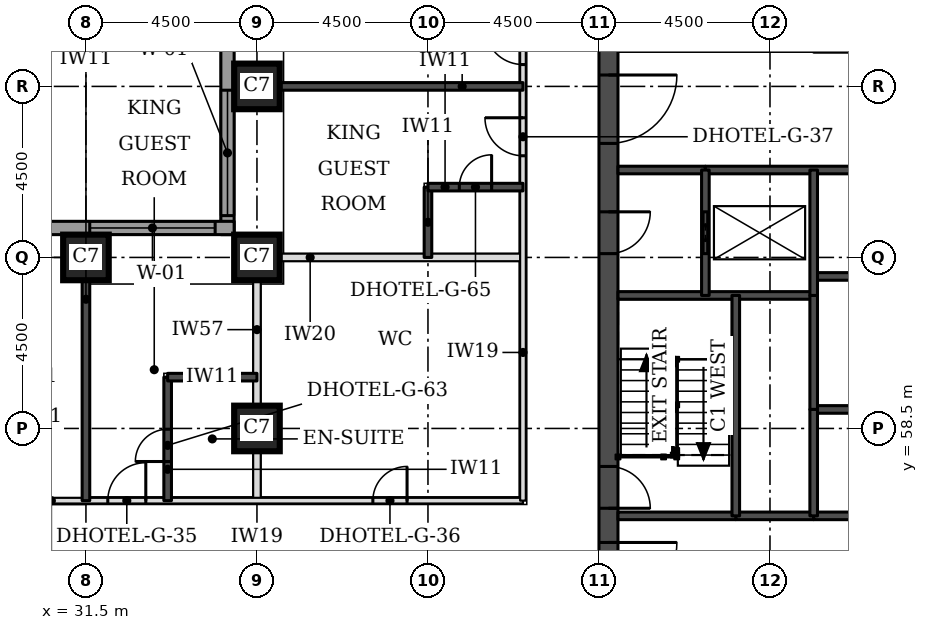
"""IFC4 building model, lengths in metres.
Left out: names, types, materials, properties, quantities, classifications, styles, units other than length and angle.
Written with IfcOpenShell. Run it as: python <this file> out.ifc"""

import sys

from ifc_helpers import new_model, si_unit, direction, frame, frame_2d, origin, origin_2d, place, context, subcontext, project, spatial, rectangle, extrude, element, fill, save


model = new_model("IFC4")
c1 = context("Model", 3, precision=1e-05, world=origin(), true_north=direction((0.0, 1.0)))
c2 = subcontext(c1, "Body", "Model", "MODEL_VIEW")
j1 = project(units=[si_unit("LENGTHUNIT", "METRE"), si_unit("PLANEANGLEUNIT", "RADIAN")], contexts=[c1])
p1 = place(None, origin())
s1 = spatial("IfcSite", under=j1, at=p1, CompositionType="ELEMENT")
p2 = place(p1, origin())
s2 = spatial("IfcBuilding", under=s1, at=p2, CompositionType="ELEMENT")
p3 = place(p2, frame((0.0, 0.0, 66.0)))
s3 = spatial("IfcBuildingStorey", under=s2, at=p3, CompositionType="ELEMENT", Elevation=66.0)
for number, where, z_axis, x_axis in (
    (1, (36.0, 58.5, 0.0), (0.0, 0.0, 1.0), (1.0, 0.0, 0.0)),
    (2, (31.5, 63.0, 0.0), (0.0, 0.0, 1.0), (1.0, 0.0, 0.0)),
    (3, (36.0, 63.0, 0.0), (0.0, 0.0, 1.0), (1.0, 0.0, 0.0)),
    (4, (36.0, 67.5, 0.0), (0.0, 0.0, 1.0), (1.0, 0.0, 0.0)),
):
    element("IfcColumn", number, at=place(p3, frame(where, z_axis=z_axis, x_axis=x_axis)), inside=s3, PredefinedType="COLUMN", context=c2, shape_type="SweptSolid", body=[
        extrude(rectangle(XDim=1.2, YDim=1.2, at=origin_2d()), origin(), (0.0, 0.0, 1.0), 3.3),
    ])
p4 = place(p3, frame((45.25, 49.5, 0.0), z_axis=(0.0, 0.0, 1.0), x_axis=(0.0, 1.0, 0.0)))
e5 = element("IfcWall", 5, at=p4, inside=s3, PredefinedType="SHEAR", context=c2, shape_type="SweptSolid", body=[
    extrude(rectangle(XDim=22.5, YDim=0.5, at=frame_2d((11.25, 0.0))), origin(), (0.0, 0.0, 1.0), 3.3),
])
p5 = place(p4, frame((4.2, 0.0, 0.0)))
e6 = element("IfcOpeningElement", 6, at=p5, cuts=e5, PredefinedType="OPENING", context=c2, shape_type="SweptSolid", body=[
    extrude(rectangle(XDim=1.8, YDim=2.1, at=frame_2d((0.9, 1.05))), frame((0.0, 0.26, 0.0), z_axis=(0.0, -1.0, 0.0), x_axis=(1.0, 0.0, 0.0)), (0.0, 0.0, 1.0), 0.52),
])
p6 = place(p4, frame((6.9, 0.0, 0.0)))
e7 = element("IfcOpeningElement", 7, at=p6, cuts=e5, PredefinedType="OPENING", context=c2, shape_type="SweptSolid", body=[
    extrude(rectangle(XDim=1.1, YDim=2.1, at=frame_2d((0.55, 1.05))), frame((0.0, 0.26, 0.0), z_axis=(0.0, -1.0, 0.0), x_axis=(1.0, 0.0, 0.0)), (0.0, 0.0, 1.0), 0.52),
])
p7 = place(p4, frame((13.6, 0.0, 0.0)))
e8 = element("IfcOpeningElement", 8, at=p7, cuts=e5, PredefinedType="OPENING", context=c2, shape_type="SweptSolid", body=[
    extrude(rectangle(XDim=1.1, YDim=2.1, at=frame_2d((0.55, 1.05))), frame((0.0, 0.26, 0.0), z_axis=(0.0, -1.0, 0.0), x_axis=(1.0, 0.0, 0.0)), (0.0, 0.0, 1.0), 0.52),
])
p8 = place(p4, frame((16.5, 0.0, 0.0)))
e9 = element("IfcOpeningElement", 9, at=p8, cuts=e5, PredefinedType="OPENING", context=c2, shape_type="SweptSolid", body=[
    extrude(rectangle(XDim=1.8, YDim=2.1, at=frame_2d((0.9, 1.05))), frame((0.0, 0.26, 0.0), z_axis=(0.0, -1.0, 0.0), x_axis=(1.0, 0.0, 0.0)), (0.0, 0.0, 1.0), 0.52),
])
p9 = place(p3, frame((35.225, 76.894, 0.0), z_axis=(0.0, 0.0, 1.0), x_axis=(0.0, -1.0, 0.0)))
e10 = element("IfcWall", 10, at=p9, inside=s3, PredefinedType="STANDARD", context=c2, shape_type="SweptSolid", body=[
    extrude(rectangle(XDim=13.293, YDim=0.35, at=frame_2d((6.647, 0.0))), origin(), (0.0, 0.0, 1.0), 3.055),
])
p10 = place(p9, frame((9.493, 0.0, 0.8)))
e11 = element("IfcOpeningElement", 11, at=p10, cuts=e10, PredefinedType="OPENING", context=c2, shape_type="SweptSolid", body=[
    extrude(rectangle(XDim=3.3, YDim=1.5, at=frame_2d((1.65, 0.75))), frame((0.0, 0.185, 0.0), z_axis=(0.0, -1.0, 0.0), x_axis=(1.0, 0.0, 0.0)), (0.0, 0.0, 1.0), 0.37),
])
p11 = place(p3, frame((35.4, 63.775, 0.0), z_axis=(0.0, 0.0, 1.0), x_axis=(-1.0, 0.0, 0.0)))
e12 = element("IfcWall", 12, at=p11, inside=s3, PredefinedType="STANDARD", context=c2, shape_type="SweptSolid", body=[
    extrude(rectangle(XDim=17.793, YDim=0.35, at=frame_2d((8.897, 0.0))), origin(), (0.0, 0.0, 1.0), 3.055),
])
p12 = place(p11, frame((0.5, 0.0, 0.8)))
e13 = element("IfcOpeningElement", 13, at=p12, cuts=e12, PredefinedType="OPENING", context=c2, shape_type="SweptSolid", body=[
    extrude(rectangle(XDim=3.3, YDim=1.5, at=frame_2d((1.65, 0.75))), frame((0.0, 0.185, 0.0), z_axis=(0.0, -1.0, 0.0), x_axis=(1.0, 0.0, 0.0)), (0.0, 0.0, 1.0), 0.37),
])
p13 = place(p11, frame((9.0, 0.0, 0.8)))
e14 = element("IfcOpeningElement", 14, at=p13, cuts=e12, PredefinedType="OPENING", context=c2, shape_type="SweptSolid", body=[
    extrude(rectangle(XDim=3.3, YDim=1.5, at=frame_2d((1.65, 0.75))), frame((0.0, 0.185, 0.0), z_axis=(0.0, -1.0, 0.0), x_axis=(1.0, 0.0, 0.0)), (0.0, 0.0, 1.0), 0.37),
])
p14 = place(p3, frame((36.0, 56.6, 0.0), z_axis=(0.0, 0.0, 1.0), x_axis=(0.0, 1.0, 0.0)))
e15 = element("IfcWall", 15, at=p14, inside=s3, PredefinedType="PARTITIONING", context=c2, shape_type="SweptSolid", body=[
    extrude(rectangle(XDim=5.8, YDim=0.2, at=frame_2d((2.9, 0.0))), origin(), (0.0, 0.0, 1.0), 2.33),
])
p15 = place(p3, frame((36.6, 63.0, 0.0), z_axis=(0.0, 0.0, 1.0), x_axis=(1.0, 0.0, 0.0)))
e16 = element("IfcWall", 16, at=p15, inside=s3, PredefinedType="PARTITIONING", context=c2, shape_type="SweptSolid", body=[
    extrude(rectangle(XDim=6.4, YDim=0.2, at=frame_2d((3.2, 0.0))), origin(), (0.0, 0.0, 1.0), 3.08),
])
p16 = place(p3, frame((29.38, 56.6, 0.0), z_axis=(0.0, 0.0, 1.0), x_axis=(1.0, 0.0, 0.0)))
e17 = element("IfcWall", 17, at=p16, inside=s3, PredefinedType="PARTITIONING", context=c2, shape_type="SweptSolid", body=[
    extrude(rectangle(XDim=13.62, YDim=0.15, at=frame_2d((6.81, 0.0))), origin(), (0.0, 0.0, 1.0), 3.08),
])
p17 = place(p16, frame((2.695, 0.0, 0.0)))
e18 = element("IfcOpeningElement", 18, at=p17, cuts=e17, PredefinedType="OPENING", context=c2, shape_type="SweptSolid", body=[
    extrude(rectangle(XDim=1.0, YDim=2.1, at=frame_2d((0.5, 1.05))), frame((0.0, 0.085, 0.0), z_axis=(0.0, -1.0, 0.0), x_axis=(1.0, 0.0, 0.0)), (0.0, 0.0, 1.0), 0.17),
])
p18 = place(p16, frame((9.67, 0.0, 0.0)))
e19 = element("IfcOpeningElement", 19, at=p18, cuts=e17, PredefinedType="OPENING", context=c2, shape_type="SweptSolid", body=[
    extrude(rectangle(XDim=0.9, YDim=2.1, at=frame_2d((0.45, 1.05))), frame((0.0, 0.085, 0.0), z_axis=(0.0, -1.0, 0.0), x_axis=(1.0, 0.0, 0.0)), (0.0, 0.0, 1.0), 0.17),
])
p19 = place(p3, frame((43.0, 56.6, 0.0), z_axis=(0.0, 0.0, 1.0), x_axis=(0.0, 1.0, 0.0)))
e20 = element("IfcWall", 20, at=p19, inside=s3, PredefinedType="PARTITIONING", context=c2, shape_type="SweptSolid", body=[
    extrude(rectangle(XDim=17.4, YDim=0.15, at=frame_2d((8.7, 0.0))), origin(), (0.0, 0.0, 1.0), 3.08),
])
p20 = place(p19, frame((9.075, 0.0, 0.0)))
e21 = element("IfcOpeningElement", 21, at=p20, cuts=e20, PredefinedType="OPENING", context=c2, shape_type="SweptSolid", body=[
    extrude(rectangle(XDim=1.0, YDim=2.1, at=frame_2d((0.5, 1.05))), frame((0.0, 0.085, 0.0), z_axis=(0.0, -1.0, 0.0), x_axis=(1.0, 0.0, 0.0)), (0.0, 0.0, 1.0), 0.17),
])
p21 = place(p19, frame((11.475, 0.0, 0.0)))
e22 = element("IfcOpeningElement", 22, at=p21, cuts=e20, PredefinedType="OPENING", context=c2, shape_type="SweptSolid", body=[
    extrude(rectangle(XDim=1.0, YDim=2.1, at=frame_2d((0.5, 1.05))), frame((0.0, 0.085, 0.0), z_axis=(0.0, -1.0, 0.0), x_axis=(1.0, 0.0, 0.0)), (0.0, 0.0, 1.0), 0.17),
])
p22 = place(p19, frame((15.953, 0.0, 0.0)))
e23 = element("IfcOpeningElement", 23, at=p22, cuts=e20, PredefinedType="OPENING", context=c2, shape_type="SweptSolid", body=[
    extrude(rectangle(XDim=1.0, YDim=2.1, at=frame_2d((0.5, 1.05))), frame((0.0, 0.085, 0.0), z_axis=(0.0, -1.0, 0.0), x_axis=(1.0, 0.0, 0.0)), (0.0, 0.0, 1.0), 0.17),
])
p23 = place(p3, frame((31.5, 56.6, 0.0), z_axis=(0.0, 0.0, 1.0), x_axis=(0.0, 1.0, 0.0)))
e24 = element("IfcWall", 24, at=p23, inside=s3, PredefinedType="SOLIDWALL", context=c2, shape_type="SweptSolid", body=[
    extrude(rectangle(XDim=5.8, YDim=0.2, at=frame_2d((2.9, 0.0))), origin(), (0.0, 0.0, 1.0), 3.08),
])
p24 = place(p3, frame((33.65, 56.6, 0.0), z_axis=(0.0, 0.0, 1.0), x_axis=(0.0, 1.0, 0.0)))
e25 = element("IfcWall", 25, at=p24, inside=s3, PredefinedType="SOLIDWALL", context=c2, shape_type="SweptSolid", body=[
    extrude(rectangle(XDim=3.25, YDim=0.2, at=frame_2d((1.625, 0.0))), origin(), (0.0, 0.0, 1.0), 3.08),
])
p25 = place(p24, frame((1.03, 0.0, 0.0)))
e26 = element("IfcOpeningElement", 26, at=p25, cuts=e25, PredefinedType="OPENING", context=c2, shape_type="SweptSolid", body=[
    extrude(rectangle(XDim=0.85, YDim=2.1, at=frame_2d((0.425, 1.05))), frame((0.0, 0.11, 0.0), z_axis=(0.0, -1.0, 0.0), x_axis=(1.0, 0.0, 0.0)), (0.0, 0.0, 1.0), 0.22),
])
p26 = place(p3, frame((33.65, 59.85, 0.0), z_axis=(0.0, 0.0, 1.0), x_axis=(1.0, 0.0, 0.0)))
e27 = element("IfcWall", 27, at=p26, inside=s3, PredefinedType="SOLIDWALL", context=c2, shape_type="SweptSolid", body=[
    extrude(rectangle(XDim=2.35, YDim=0.2, at=frame_2d((1.175, 0.0))), origin(), (0.0, 0.0, 1.0), 3.08),
])
p27 = place(p3, frame((40.5, 63.0, 0.0), z_axis=(0.0, 0.0, 1.0), x_axis=(0.0, 1.0, 0.0)))
e28 = element("IfcWall", 28, at=p27, inside=s3, PredefinedType="SOLIDWALL", context=c2, shape_type="SweptSolid", body=[
    extrude(rectangle(XDim=1.85, YDim=0.2, at=frame_2d((0.925, 0.0))), origin(), (0.0, 0.0, 1.0), 3.08),
])
p28 = place(p3, frame((40.5, 64.85, 0.0), z_axis=(0.0, 0.0, 1.0), x_axis=(1.0, 0.0, 0.0)))
e29 = element("IfcWall", 29, at=p28, inside=s3, PredefinedType="SOLIDWALL", context=c2, shape_type="SweptSolid", body=[
    extrude(rectangle(XDim=2.5, YDim=0.2, at=frame_2d((1.25, 0.0))), origin(), (0.0, 0.0, 1.0), 3.08),
])
p29 = place(p28, frame((0.825, 0.0, 0.0)))
e30 = element("IfcOpeningElement", 30, at=p29, cuts=e29, PredefinedType="OPENING", context=c2, shape_type="SweptSolid", body=[
    extrude(rectangle(XDim=0.85, YDim=2.1, at=frame_2d((0.425, 1.05))), frame((0.0, 0.11, 0.0), z_axis=(0.0, -1.0, 0.0), x_axis=(1.0, 0.0, 0.0)), (0.0, 0.0, 1.0), 0.22),
])
p30 = place(p3, frame((36.6, 67.5, 0.0), z_axis=(0.0, 0.0, 1.0), x_axis=(1.0, 0.0, 0.0)))
e31 = element("IfcWall", 31, at=p30, inside=s3, PredefinedType="SOLIDWALL", context=c2, shape_type="SweptSolid", body=[
    extrude(rectangle(XDim=6.4, YDim=0.2, at=frame_2d((3.2, 0.0))), origin(), (0.0, 0.0, 1.0), 3.08),
])
p31 = place(p3, frame((48.6, 56.2, 0.0), z_axis=(0.0, 0.0, 1.0), x_axis=(1.0, 0.0, 0.0)))
e32 = element("IfcWall", 32, at=p31, inside=s3, PredefinedType="SOLIDWALL", context=c2, shape_type="SweptSolid", body=[
    extrude(rectangle(XDim=2.05, YDim=0.2, at=frame_2d((1.025, 0.0))), origin(), (0.0, 0.0, 1.0), 3.08),
])
p32 = place(p3, frame((45.5, 56.2, 0.0), z_axis=(0.0, 0.0, 1.0), x_axis=(1.0, 0.0, 0.0)))
e33 = element("IfcWall", 33, at=p32, inside=s3, PredefinedType="SOLIDWALL", context=c2, shape_type="SweptSolid", body=[
    extrude(rectangle(XDim=3.1, YDim=0.2, at=frame_2d((1.55, 0.0))), origin(), (0.0, 0.0, 1.0), 3.08),
])
p33 = place(p3, frame((50.65, 56.2, 0.0), z_axis=(0.0, 0.0, 1.0), x_axis=(1.0, 0.0, 0.0)))
e34 = element("IfcWall", 34, at=p33, inside=s3, PredefinedType="SOLIDWALL", context=c2, shape_type="SweptSolid", body=[
    extrude(rectangle(XDim=11.2, YDim=0.2, at=frame_2d((5.6, 0.0))), origin(), (0.0, 0.0, 1.0), 3.08),
])
p34 = place(p3, frame((50.65, 59.0, 0.0), z_axis=(0.0, 0.0, 1.0), x_axis=(1.0, 0.0, 0.0)))
e35 = element("IfcWall", 35, at=p34, inside=s3, PredefinedType="SOLIDWALL", context=c2, shape_type="SweptSolid", body=[
    extrude(rectangle(XDim=11.2, YDim=0.2, at=frame_2d((5.6, 0.0))), origin(), (0.0, 0.0, 1.0), 3.3),
])
p35 = place(p3, frame((45.5, 62.0, 0.0), z_axis=(0.0, 0.0, 1.0), x_axis=(1.0, 0.0, 0.0)))
e36 = element("IfcWall", 36, at=p35, inside=s3, PredefinedType="SOLIDWALL", context=c2, shape_type="SweptSolid", body=[
    extrude(rectangle(XDim=5.15, YDim=0.2, at=frame_2d((2.575, 0.0))), origin(), (0.0, 0.0, 1.0), 3.08),
])
p36 = place(p3, frame((50.65, 62.5, 0.0), z_axis=(0.0, 0.0, 1.0), x_axis=(1.0, 0.0, 0.0)))
e37 = element("IfcWall", 37, at=p36, inside=s3, PredefinedType="SOLIDWALL", context=c2, shape_type="SweptSolid", body=[
    extrude(rectangle(XDim=11.2, YDim=0.2, at=frame_2d((5.6, 0.0))), origin(), (0.0, 0.0, 1.0), 3.3),
])
p37 = place(p3, frame((45.5, 65.3, 0.0), z_axis=(0.0, 0.0, 1.0), x_axis=(1.0, 0.0, 0.0)))
e38 = element("IfcWall", 38, at=p37, inside=s3, PredefinedType="SOLIDWALL", context=c2, shape_type="SweptSolid", body=[
    extrude(rectangle(XDim=2.3, YDim=0.2, at=frame_2d((1.15, 0.0))), origin(), (0.0, 0.0, 1.0), 3.08),
])
p38 = place(p3, frame((47.8, 65.3, 0.0), z_axis=(0.0, 0.0, 1.0), x_axis=(1.0, 0.0, 0.0)))
e39 = element("IfcWall", 39, at=p38, inside=s3, PredefinedType="SOLIDWALL", context=c2, shape_type="SweptSolid", body=[
    extrude(rectangle(XDim=16.9, YDim=0.2, at=frame_2d((8.45, 0.0))), origin(), (0.0, 0.0, 1.0), 3.08),
])
p39 = place(p3, frame((47.8, 62.0, 0.0), z_axis=(0.0, 0.0, 1.0), x_axis=(0.0, 1.0, 0.0)))
e40 = element("IfcWall", 40, at=p39, inside=s3, PredefinedType="SOLIDWALL", context=c2, shape_type="SweptSolid", body=[
    extrude(rectangle(XDim=3.3, YDim=0.2, at=frame_2d((1.65, 0.0))), origin(), (0.0, 0.0, 1.0), 3.08),
])
p40 = place(p39, frame((1.1, 0.0, 0.0)))
e41 = element("IfcOpeningElement", 41, at=p40, cuts=e40, PredefinedType="OPENING", context=c2, shape_type="SweptSolid", body=[
    extrude(rectangle(XDim=1.1, YDim=2.1, at=frame_2d((0.55, 1.05))), frame((0.0, 0.11, 0.0), z_axis=(0.0, -1.0, 0.0), x_axis=(1.0, 0.0, 0.0)), (0.0, 0.0, 1.0), 0.22),
])
p41 = place(p3, frame((48.6, 56.2, 0.0), z_axis=(0.0, 0.0, 1.0), x_axis=(0.0, 1.0, 0.0)))
e42 = element("IfcWall", 42, at=p41, inside=s3, PredefinedType="SOLIDWALL", context=c2, shape_type="SweptSolid", body=[
    extrude(rectangle(XDim=5.8, YDim=0.2, at=frame_2d((2.9, 0.0))), origin(), (0.0, 0.0, 1.0), 3.08),
])
p42 = place(p3, frame((50.65, 59.0, 0.0), z_axis=(0.0, 0.0, 1.0), x_axis=(0.0, 1.0, 0.0)))
e43 = element("IfcWall", 43, at=p42, inside=s3, PredefinedType="SOLIDWALL", context=c2, shape_type="SweptSolid", body=[
    extrude(rectangle(XDim=3.0, YDim=0.2, at=frame_2d((1.5, 0.0))), origin(), (0.0, 0.0, 1.0), 3.3),
])
p43 = place(p3, frame((50.65, 56.2, 0.0), z_axis=(0.0, 0.0, 1.0), x_axis=(0.0, 1.0, 0.0)))
e44 = element("IfcWall", 44, at=p43, inside=s3, PredefinedType="SOLIDWALL", context=c2, shape_type="SweptSolid", body=[
    extrude(rectangle(XDim=2.8, YDim=0.2, at=frame_2d((1.4, 0.0))), origin(), (0.0, 0.0, 1.0), 3.08),
])
p44 = place(p3, frame((50.65, 62.0, 0.0), z_axis=(0.0, 0.0, 1.0), x_axis=(0.0, 1.0, 0.0)))
e45 = element("IfcWall", 45, at=p44, inside=s3, PredefinedType="SOLIDWALL", context=c2, shape_type="SweptSolid", body=[
    extrude(rectangle(XDim=3.3, YDim=0.2, at=frame_2d((1.65, 0.0))), origin(), (0.0, 0.0, 1.0), 3.08),
])
p45 = place(p10, origin())
e46 = element("IfcWindow", 46, at=p45, inside=s3, PartitioningType="SINGLE_PANEL", PredefinedType="WINDOW", context=c2, shape_type="SweptSolid", body=[
    extrude(rectangle(XDim=3.3, YDim=1.5, at=frame_2d((1.65, 0.75))), frame((0.0, 0.085, 0.0), z_axis=(0.0, -1.0, 0.0), x_axis=(1.0, 0.0, 0.0)), (0.0, 0.0, 1.0), 0.06),
])
fill(e11, e46)
p46 = place(p12, origin())
e47 = element("IfcWindow", 47, at=p46, inside=s3, PartitioningType="SINGLE_PANEL", PredefinedType="WINDOW", context=c2, shape_type="SweptSolid", body=[
    extrude(rectangle(XDim=3.3, YDim=1.5, at=frame_2d((1.65, 0.75))), frame((0.0, 0.085, 0.0), z_axis=(0.0, -1.0, 0.0), x_axis=(1.0, 0.0, 0.0)), (0.0, 0.0, 1.0), 0.06),
])
fill(e13, e47)
p47 = place(p17, origin())
e48 = element("IfcDoor", 48, at=p47, inside=s3, OperationType="SINGLE_SWING_RIGHT", PredefinedType="DOOR", context=c2, shape_type="SweptSolid", body=[
    extrude(rectangle(XDim=1.0, YDim=2.1, at=frame_2d((0.5, 1.05))), frame((0.0, 0.025, 0.0), z_axis=(0.0, -1.0, 0.0), x_axis=(1.0, 0.0, 0.0)), (0.0, 0.0, 1.0), 0.05),
])
fill(e18, e48)
p48 = place(p25, origin())
e49 = element("IfcDoor", 49, at=p48, inside=s3, OperationType="SINGLE_SWING_LEFT", PredefinedType="DOOR", context=c2, shape_type="SweptSolid", body=[
    extrude(rectangle(XDim=0.85, YDim=2.1, at=frame_2d((0.425, 1.05))), frame((0.0, 0.025, 0.0), z_axis=(0.0, -1.0, 0.0), x_axis=(1.0, 0.0, 0.0)), (0.0, 0.0, 1.0), 0.05),
])
fill(e26, e49)
p49 = place(p20, origin())
e50 = element("IfcDoor", 50, at=p49, inside=s3, OperationType="SINGLE_SWING_RIGHT", PredefinedType="DOOR", context=c2, shape_type="SweptSolid", body=[
    extrude(rectangle(XDim=1.0, YDim=2.1, at=frame_2d((0.5, 1.05))), frame((0.0, 0.025, 0.0), z_axis=(0.0, -1.0, 0.0), x_axis=(1.0, 0.0, 0.0)), (0.0, 0.0, 1.0), 0.05),
])
fill(e21, e50)
p50 = place(p29, origin())
e51 = element("IfcDoor", 51, at=p50, inside=s3, OperationType="SINGLE_SWING_RIGHT", PredefinedType="DOOR", context=c2, shape_type="SweptSolid", body=[
    extrude(rectangle(XDim=0.85, YDim=2.1, at=frame_2d((0.425, 1.05))), frame((0.0, 0.025, 0.0), z_axis=(0.0, -1.0, 0.0), x_axis=(1.0, 0.0, 0.0)), (0.0, 0.0, 1.0), 0.05),
])
fill(e30, e51)
p51 = place(p21, origin())
e52 = element("IfcDoor", 52, at=p51, inside=s3, OperationType="SINGLE_SWING_RIGHT", PredefinedType="DOOR", context=c2, shape_type="SweptSolid", body=[
    extrude(rectangle(XDim=1.0, YDim=2.1, at=frame_2d((0.5, 1.05))), frame((0.0, 0.025, 0.0), z_axis=(0.0, -1.0, 0.0), x_axis=(1.0, 0.0, 0.0)), (0.0, 0.0, 1.0), 0.05),
])
fill(e22, e52)
p52 = place(p18, origin())
e53 = element("IfcDoor", 53, at=p52, inside=s3, OperationType="SINGLE_SWING_RIGHT", PredefinedType="DOOR", context=c2, shape_type="SweptSolid", body=[
    extrude(rectangle(XDim=0.9, YDim=2.1, at=frame_2d((0.45, 1.05))), frame((0.0, 0.025, 0.0), z_axis=(0.0, -1.0, 0.0), x_axis=(1.0, 0.0, 0.0)), (0.0, 0.0, 1.0), 0.05),
])
fill(e19, e53)
p53 = place(p40, origin())
e54 = element("IfcDoor", 54, at=p53, inside=s3, OperationType="DOUBLE_DOOR_SLIDING", PredefinedType="DOOR", context=c2, shape_type="SweptSolid", body=[
    extrude(rectangle(XDim=1.1, YDim=2.1, at=frame_2d((0.55, 1.05))), frame((0.0, 0.025, 0.0), z_axis=(0.0, -1.0, 0.0), x_axis=(1.0, 0.0, 0.0)), (0.0, 0.0, 1.0), 0.05),
])
fill(e41, e54)
p54 = place(p5, frame((1.8, 0.0, 0.0), z_axis=(0.0, 0.0, 1.0), x_axis=(-1.0, 0.0, 0.0)))
e55 = element("IfcDoor", 55, at=p54, inside=s3, OperationType="SINGLE_SWING_LEFT", PredefinedType="DOOR", context=c2, shape_type="SweptSolid", body=[
    extrude(rectangle(XDim=1.8, YDim=2.1, at=frame_2d((0.9, 1.05))), frame((0.0, 0.025, 0.0), z_axis=(0.0, -1.0, 0.0), x_axis=(1.0, 0.0, 0.0)), (0.0, 0.0, 1.0), 0.05),
])
fill(e6, e55)
p55 = place(p6, frame((1.1, 0.0, 0.0), z_axis=(0.0, 0.0, 1.0), x_axis=(-1.0, 0.0, 0.0)))
e56 = element("IfcDoor", 56, at=p55, inside=s3, OperationType="SINGLE_SWING_RIGHT", PredefinedType="DOOR", context=c2, shape_type="SweptSolid", body=[
    extrude(rectangle(XDim=1.1, YDim=2.1, at=frame_2d((0.55, 1.05))), frame((0.0, 0.025, 0.0), z_axis=(0.0, -1.0, 0.0), x_axis=(1.0, 0.0, 0.0)), (0.0, 0.0, 1.0), 0.05),
])
fill(e7, e56)
p56 = place(p7, frame((1.1, 0.0, 0.0), z_axis=(0.0, 0.0, 1.0), x_axis=(-1.0, 0.0, 0.0)))
e57 = element("IfcDoor", 57, at=p56, inside=s3, OperationType="SINGLE_SWING_LEFT", PredefinedType="DOOR", context=c2, shape_type="SweptSolid", body=[
    extrude(rectangle(XDim=1.1, YDim=2.1, at=frame_2d((0.55, 1.05))), frame((0.0, 0.025, 0.0), z_axis=(0.0, -1.0, 0.0), x_axis=(1.0, 0.0, 0.0)), (0.0, 0.0, 1.0), 0.05),
])
fill(e8, e57)
p57 = place(p8, frame((1.8, 0.0, 0.0), z_axis=(0.0, 0.0, 1.0), x_axis=(-1.0, 0.0, 0.0)))
e58 = element("IfcDoor", 58, at=p57, inside=s3, OperationType="SINGLE_SWING_LEFT", PredefinedType="DOOR", context=c2, shape_type="SweptSolid", body=[
    extrude(rectangle(XDim=1.8, YDim=2.1, at=frame_2d((0.9, 1.05))), frame((0.0, 0.025, 0.0), z_axis=(0.0, -1.0, 0.0), x_axis=(1.0, 0.0, 0.0)), (0.0, 0.0, 1.0), 0.05),
])
fill(e9, e58)
save(model, sys.argv[1])
